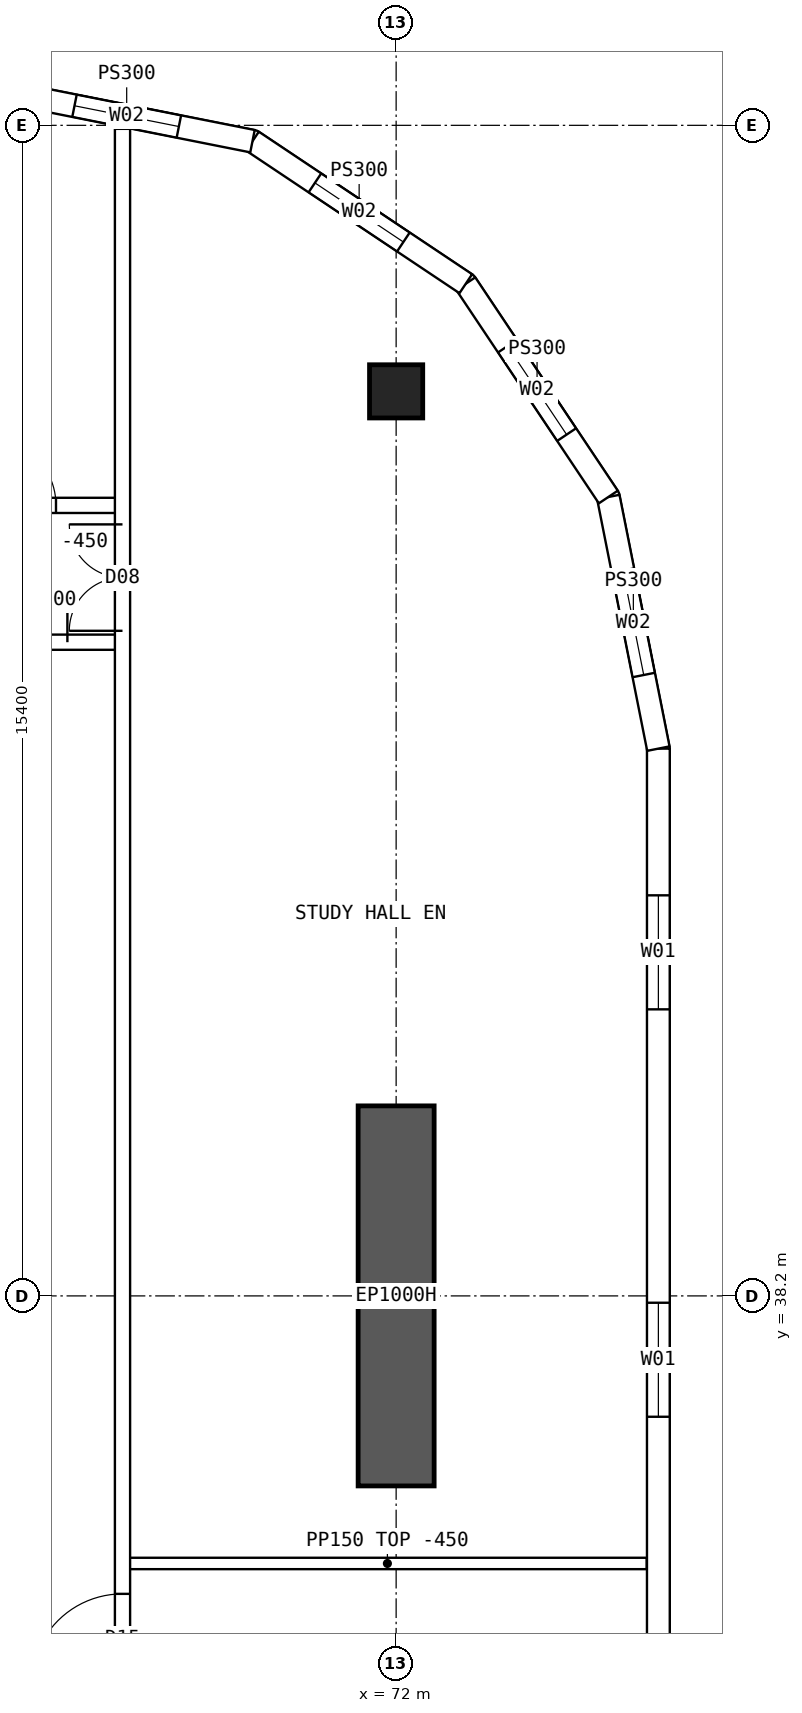
"""IFC4 building model, lengths in metres.
Left out: names, types, materials, properties, quantities, classifications, styles, units other than length and angle.
Written with IfcOpenShell. Run it as: python <this file> out.ifc"""

import sys

from ifc_helpers import new_model, si_unit, direction, frame, frame_2d, origin, origin_2d, place, context, subcontext, project, spatial, polyline, rectangle, hollow_rectangle, outline, extrude, element, fill, save


model = new_model("IFC4")
c1 = context("Model", 3, precision=1e-05, world=origin(), true_north=direction((0.0, 1.0)))
c2 = subcontext(c1, "Body", "Model", "MODEL_VIEW")
j1 = project(units=[si_unit("LENGTHUNIT", "METRE"), si_unit("PLANEANGLEUNIT", "RADIAN")], contexts=[c1])
p1 = place(None, origin())
s1 = spatial("IfcSite", under=j1, at=p1, CompositionType="ELEMENT")
p2 = place(p1, origin())
s2 = spatial("IfcBuilding", under=s1, at=p2, CompositionType="ELEMENT")
p3 = place(p2, frame((0.0, 0.0, 159.85)))
s3 = spatial("IfcBuildingStorey", under=s2, at=p3, CompositionType="ELEMENT", Elevation=159.85)
p4 = place(p3, frame((72.0, 50.1, 0.0), z_axis=(0.0, 0.0, 1.0), x_axis=(1.0, 0.0, 0.0)))
e1 = element("IfcColumn", 1, at=p4, inside=s3, PredefinedType="COLUMN", context=c2, shape_type="SweptSolid", body=[
    extrude(hollow_rectangle(XDim=0.7, YDim=0.7, WallThickness=0.07, at=origin_2d()), origin(), (0.0, 0.0, 1.0), 3.75),
])
p5 = place(p3, frame((72.0, 35.7, 0.0), z_axis=(0.0, 0.0, 1.0), x_axis=(0.0, 1.0, 0.0)))
e2 = element("IfcWall", 2, at=p5, inside=s3, PredefinedType="SHEAR", context=c2, shape_type="SweptSolid", body=[
    extrude(rectangle(XDim=5.0, YDim=1.0, at=frame_2d((2.5, 0.0))), origin(), (0.0, 0.0, 1.0), 3.75),
])
p6 = place(p3, frame((75.45, 18.6, 0.0), z_axis=(0.0, 0.0, 1.0), x_axis=(0.0, 1.0, 0.0)))
e3 = element("IfcWall", 3, at=p6, inside=s3, PredefinedType="SOLIDWALL", context=c2, shape_type="SweptSolid", body=[
    extrude(outline(polyline([(-0.015, -0.15), (26.815, -0.15), (26.785, 0.15), (0.015, 0.15), (-0.015, -0.15)])), origin(), (0.0, 0.0, 1.0), 3.3),
])
p7 = place(p6, frame((1.93, 0.0, 0.9)))
e4 = element("IfcOpeningElement", 4, at=p7, cuts=e3, PredefinedType="OPENING", context=c2, shape_type="SweptSolid", body=[
    extrude(rectangle(XDim=1.5, YDim=2.0, at=frame_2d((0.75, 1.0))), frame((0.0, 0.16, 0.0), z_axis=(0.0, -1.0, 0.0), x_axis=(1.0, 0.0, 0.0)), (0.0, 0.0, 1.0), 0.32),
])
p8 = place(p6, frame((7.29, 0.0, 0.9)))
e5 = element("IfcOpeningElement", 5, at=p8, cuts=e3, PredefinedType="OPENING", context=c2, shape_type="SweptSolid", body=[
    extrude(rectangle(XDim=1.5, YDim=2.0, at=frame_2d((0.75, 1.0))), frame((0.0, 0.16, 0.0), z_axis=(0.0, -1.0, 0.0), x_axis=(1.0, 0.0, 0.0)), (0.0, 0.0, 1.0), 0.32),
])
p9 = place(p6, frame((12.65, 0.0, 0.9)))
e6 = element("IfcOpeningElement", 6, at=p9, cuts=e3, PredefinedType="OPENING", context=c2, shape_type="SweptSolid", body=[
    extrude(rectangle(XDim=1.5, YDim=2.0, at=frame_2d((0.75, 1.0))), frame((0.0, 0.16, 0.0), z_axis=(0.0, -1.0, 0.0), x_axis=(1.0, 0.0, 0.0)), (0.0, 0.0, 1.0), 0.32),
])
p10 = place(p6, frame((18.01, 0.0, 0.9)))
e7 = element("IfcOpeningElement", 7, at=p10, cuts=e3, PredefinedType="OPENING", context=c2, shape_type="SweptSolid", body=[
    extrude(rectangle(XDim=1.5, YDim=2.0, at=frame_2d((0.75, 1.0))), frame((0.0, 0.16, 0.0), z_axis=(0.0, -1.0, 0.0), x_axis=(1.0, 0.0, 0.0)), (0.0, 0.0, 1.0), 0.32),
])
p11 = place(p6, frame((23.37, 0.0, 0.9)))
e8 = element("IfcOpeningElement", 8, at=p11, cuts=e3, PredefinedType="OPENING", context=c2, shape_type="SweptSolid", body=[
    extrude(rectangle(XDim=1.5, YDim=2.0, at=frame_2d((0.75, 1.0))), frame((0.0, 0.16, 0.0), z_axis=(0.0, -1.0, 0.0), x_axis=(1.0, 0.0, 0.0)), (0.0, 0.0, 1.0), 0.32),
])
p12 = place(p3, frame((75.45, 45.4, 0.0), z_axis=(0.0, 0.0, 1.0), x_axis=(-0.19508664885, 0.980786011034, 0.0)))
e9 = element("IfcWall", 9, at=p12, inside=s3, PredefinedType="SOLIDWALL", context=c2, shape_type="SweptSolid", body=[
    extrude(outline(polyline([(-0.015, -0.15), (3.405, -0.15), (3.345, 0.15), (0.015, 0.15), (-0.015, -0.15)])), origin(), (0.0, 0.0, 1.0), 3.3),
])
p13 = place(p12, frame((0.988, 0.0, 0.9)))
e10 = element("IfcOpeningElement", 10, at=p13, cuts=e9, PredefinedType="OPENING", context=c2, shape_type="SweptSolid", body=[
    extrude(rectangle(XDim=1.4, YDim=1.8, at=frame_2d((0.7, 0.9))), frame((0.0, 0.16, 0.0), z_axis=(0.0, -1.0, 0.0), x_axis=(1.0, 0.0, 0.0)), (0.0, 0.0, 1.0), 0.32),
])
p14 = place(p3, frame((74.792, 48.71, 0.0), z_axis=(0.0, 0.0, 1.0), x_axis=(-0.555534554399, 0.831493450887, 0.0)))
e11 = element("IfcWall", 11, at=p14, inside=s3, PredefinedType="SOLIDWALL", context=c2, shape_type="SweptSolid", body=[
    extrude(outline(polyline([(-0.03, -0.15), (3.405, -0.15), (3.345, 0.15), (0.03, 0.15), (-0.03, -0.15)])), origin(), (0.0, 0.0, 1.0), 3.3),
])
p15 = place(p14, frame((0.988, 0.0, 0.9)))
e12 = element("IfcOpeningElement", 12, at=p15, cuts=e11, PredefinedType="OPENING", context=c2, shape_type="SweptSolid", body=[
    extrude(rectangle(XDim=1.4, YDim=1.8, at=frame_2d((0.7, 0.9))), frame((0.0, 0.16, 0.0), z_axis=(0.0, -1.0, 0.0), x_axis=(1.0, 0.0, 0.0)), (0.0, 0.0, 1.0), 0.32),
])
p16 = place(p3, frame((72.917, 51.517, 0.0), z_axis=(0.0, 0.0, 1.0), x_axis=(-0.831493450887, 0.555534554399, 0.0)))
e13 = element("IfcWall", 13, at=p16, inside=s3, PredefinedType="SOLIDWALL", context=c2, shape_type="SweptSolid", body=[
    extrude(outline(polyline([(-0.03, -0.15), (3.405, -0.15), (3.345, 0.15), (0.03, 0.15), (-0.03, -0.15)])), origin(), (0.0, 0.0, 1.0), 3.3),
])
p17 = place(p16, frame((0.988, 0.0, 0.9)))
e14 = element("IfcOpeningElement", 14, at=p17, cuts=e13, PredefinedType="OPENING", context=c2, shape_type="SweptSolid", body=[
    extrude(rectangle(XDim=1.4, YDim=1.8, at=frame_2d((0.7, 0.9))), frame((0.0, 0.16, 0.0), z_axis=(0.0, -1.0, 0.0), x_axis=(1.0, 0.0, 0.0)), (0.0, 0.0, 1.0), 0.32),
])
p18 = place(p3, frame((70.11, 53.392, 0.0), z_axis=(0.0, 0.0, 1.0), x_axis=(-0.98078325777, 0.195100490205, 0.0)))
e15 = element("IfcWall", 15, at=p18, inside=s3, PredefinedType="SOLIDWALL", context=c2, shape_type="SweptSolid", body=[
    extrude(outline(polyline([(-0.03, -0.15), (3.405, -0.15), (3.345, 0.15), (0.03, 0.15), (-0.03, -0.15)])), origin(), (0.0, 0.0, 1.0), 3.3),
])
p19 = place(p18, frame((0.988, 0.0, 0.9)))
e16 = element("IfcOpeningElement", 16, at=p19, cuts=e15, PredefinedType="OPENING", context=c2, shape_type="SweptSolid", body=[
    extrude(rectangle(XDim=1.4, YDim=1.8, at=frame_2d((0.7, 0.9))), frame((0.0, 0.16, 0.0), z_axis=(0.0, -1.0, 0.0), x_axis=(1.0, 0.0, 0.0)), (0.0, 0.0, 1.0), 0.32),
])
p20 = place(p3, frame((66.425, 48.6, 0.0), z_axis=(0.0, 0.0, 1.0), x_axis=(1.0, 0.0, 0.0)))
e17 = element("IfcWall", 17, at=p20, inside=s3, PredefinedType="SOLIDWALL", context=c2, shape_type="SweptSolid", body=[
    extrude(rectangle(XDim=1.975, YDim=0.2, at=frame_2d((0.987, 0.0))), origin(), (0.0, 0.0, 1.0), 3.3),
])
p21 = place(p20, frame((0.2, 0.0, 0.0)))
e18 = element("IfcOpeningElement", 18, at=p21, cuts=e17, PredefinedType="OPENING", context=c2, shape_type="SweptSolid", body=[
    extrude(rectangle(XDim=0.9, YDim=2.1, at=frame_2d((0.45, 1.05))), frame((0.0, 0.11, 0.0), z_axis=(0.0, -1.0, 0.0), x_axis=(1.0, 0.0, 0.0)), (0.0, 0.0, 1.0), 0.22),
])
p22 = place(p3, frame((66.425, 46.8, 0.0), z_axis=(0.0, 0.0, 1.0), x_axis=(1.0, 0.0, 0.0)))
e19 = element("IfcWall", 19, at=p22, inside=s3, PredefinedType="SOLIDWALL", context=c2, shape_type="SweptSolid", body=[
    extrude(rectangle(XDim=1.975, YDim=0.2, at=frame_2d((0.987, 0.0))), origin(), (0.0, 0.0, 1.0), 3.3),
])
p23 = place(p22, frame((0.05, 0.0, 0.0)))
e20 = element("IfcOpeningElement", 20, at=p23, cuts=e19, PredefinedType="OPENING", context=c2, shape_type="SweptSolid", body=[
    extrude(rectangle(XDim=1.2, YDim=2.1, at=frame_2d((0.6, 1.05))), frame((0.0, 0.11, 0.0), z_axis=(0.0, -1.0, 0.0), x_axis=(1.0, 0.0, 0.0)), (0.0, 0.0, 1.0), 0.22),
])
p24 = place(p3, frame((68.4, 10.446, 0.0), z_axis=(0.0, 0.0, 1.0), x_axis=(0.0, 1.0, 0.0)))
e21 = element("IfcWall", 21, at=p24, inside=s3, PredefinedType="SOLIDWALL", context=c2, shape_type="SweptSolid", body=[
    extrude(rectangle(XDim=43.107, YDim=0.2, at=frame_2d((21.554, 0.0))), origin(), (0.0, 0.0, 1.0), 3.3),
])
p25 = place(p24, frame((13.914, 0.0, 0.0)))
e22 = element("IfcOpeningElement", 22, at=p25, cuts=e21, PredefinedType="OPENING", context=c2, shape_type="SweptSolid", body=[
    extrude(rectangle(XDim=1.2, YDim=2.1, at=frame_2d((0.6, 1.05))), frame((0.0, 0.11, 0.0), z_axis=(0.0, -1.0, 0.0), x_axis=(1.0, 0.0, 0.0)), (0.0, 0.0, 1.0), 0.22),
])
p26 = place(p24, frame((22.634, 0.0, 0.0)))
e23 = element("IfcOpeningElement", 23, at=p26, cuts=e21, PredefinedType="OPENING", context=c2, shape_type="SweptSolid", body=[
    extrude(rectangle(XDim=1.2, YDim=2.1, at=frame_2d((0.6, 1.05))), frame((0.0, 0.11, 0.0), z_axis=(0.0, -1.0, 0.0), x_axis=(1.0, 0.0, 0.0)), (0.0, 0.0, 1.0), 0.22),
])
p27 = place(p24, frame((5.104, 0.0, 0.0)))
e24 = element("IfcOpeningElement", 24, at=p27, cuts=e21, PredefinedType="OPENING", context=c2, shape_type="SweptSolid", body=[
    extrude(rectangle(XDim=1.4, YDim=2.1, at=frame_2d((0.7, 1.05))), frame((0.0, 0.11, 0.0), z_axis=(0.0, -1.0, 0.0), x_axis=(1.0, 0.0, 0.0)), (0.0, 0.0, 1.0), 0.22),
])
p28 = place(p24, frame((36.504, 0.0, 0.0)))
e25 = element("IfcOpeningElement", 25, at=p28, cuts=e21, PredefinedType="OPENING", context=c2, shape_type="SweptSolid", body=[
    extrude(rectangle(XDim=1.4, YDim=2.1, at=frame_2d((0.7, 1.05))), frame((0.0, 0.11, 0.0), z_axis=(0.0, -1.0, 0.0), x_axis=(1.0, 0.0, 0.0)), (0.0, 0.0, 1.0), 0.22),
])
p29 = place(p3, frame((68.475, 34.68, 0.0), z_axis=(0.0, 0.0, 1.0), x_axis=(1.0, 0.0, 0.0)))
e26 = element("IfcWall", 26, at=p29, inside=s3, PredefinedType="PARTITIONING", context=c2, shape_type="SweptSolid", body=[
    extrude(outline(polyline([(0.0, 0.0), (6.82, 0.0), (6.82, 3.3), (3.827, 3.3), (3.825, 2.85), (3.227, 2.85), (3.225, 3.3), (0.0, 3.3), (0.0, 0.0)])), frame((0.0, 0.075, 0.0), z_axis=(0.0, -1.0, 0.0), x_axis=(1.0, 0.0, 0.0)), (0.0, 0.0, 1.0), 0.15),
])
p30 = place(p10, origin())
e27 = element("IfcWindow", 27, at=p30, inside=s3, PartitioningType="SINGLE_PANEL", PredefinedType="WINDOW", context=c2, shape_type="SweptSolid", body=[
    extrude(rectangle(XDim=1.5, YDim=2.0, at=frame_2d((0.75, 1.0))), frame((0.0, 0.03, 0.0), z_axis=(0.0, -1.0, 0.0), x_axis=(1.0, 0.0, 0.0)), (0.0, 0.0, 1.0), 0.06),
])
fill(e7, e27)
p31 = place(p11, origin())
e28 = element("IfcWindow", 28, at=p31, inside=s3, PartitioningType="SINGLE_PANEL", PredefinedType="WINDOW", context=c2, shape_type="SweptSolid", body=[
    extrude(rectangle(XDim=1.5, YDim=2.0, at=frame_2d((0.75, 1.0))), frame((0.0, 0.03, 0.0), z_axis=(0.0, -1.0, 0.0), x_axis=(1.0, 0.0, 0.0)), (0.0, 0.0, 1.0), 0.06),
])
fill(e8, e28)
p32 = place(p13, origin())
e29 = element("IfcWindow", 29, at=p32, inside=s3, PartitioningType="SINGLE_PANEL", PredefinedType="WINDOW", context=c2, shape_type="SweptSolid", body=[
    extrude(rectangle(XDim=1.4, YDim=1.8, at=frame_2d((0.7, 0.9))), frame((0.0, 0.03, 0.0), z_axis=(0.0, -1.0, 0.0), x_axis=(1.0, 0.0, 0.0)), (0.0, 0.0, 1.0), 0.06),
])
fill(e10, e29)
p33 = place(p15, origin())
e30 = element("IfcWindow", 30, at=p33, inside=s3, PartitioningType="SINGLE_PANEL", PredefinedType="WINDOW", context=c2, shape_type="SweptSolid", body=[
    extrude(rectangle(XDim=1.4, YDim=1.8, at=frame_2d((0.7, 0.9))), frame((0.0, 0.03, 0.0), z_axis=(0.0, -1.0, 0.0), x_axis=(1.0, 0.0, 0.0)), (0.0, 0.0, 1.0), 0.06),
])
fill(e12, e30)
p34 = place(p17, origin())
e31 = element("IfcWindow", 31, at=p34, inside=s3, PartitioningType="SINGLE_PANEL", PredefinedType="WINDOW", context=c2, shape_type="SweptSolid", body=[
    extrude(rectangle(XDim=1.4, YDim=1.8, at=frame_2d((0.7, 0.9))), frame((0.0, 0.03, 0.0), z_axis=(0.0, -1.0, 0.0), x_axis=(1.0, 0.0, 0.0)), (0.0, 0.0, 1.0), 0.06),
])
fill(e14, e31)
p35 = place(p19, origin())
e32 = element("IfcWindow", 32, at=p35, inside=s3, PartitioningType="SINGLE_PANEL", PredefinedType="WINDOW", context=c2, shape_type="SweptSolid", body=[
    extrude(rectangle(XDim=1.4, YDim=1.8, at=frame_2d((0.7, 0.9))), frame((0.0, 0.03, 0.0), z_axis=(0.0, -1.0, 0.0), x_axis=(1.0, 0.0, 0.0)), (0.0, 0.0, 1.0), 0.06),
])
fill(e16, e32)
p36 = place(p23, origin())
e33 = element("IfcDoor", 33, at=p36, inside=s3, OperationType="DOUBLE_DOOR_SINGLE_SWING", PredefinedType="DOOR", context=c2, shape_type="SweptSolid", body=[
    extrude(rectangle(XDim=1.2, YDim=2.1, at=frame_2d((0.6, 1.05))), frame((0.0, 0.025, 0.0), z_axis=(0.0, -1.0, 0.0), x_axis=(1.0, 0.0, 0.0)), (0.0, 0.0, 1.0), 0.05),
])
fill(e20, e33)
p37 = place(p26, origin())
e34 = element("IfcDoor", 34, at=p37, inside=s3, OperationType="SINGLE_SWING_LEFT", PredefinedType="DOOR", context=c2, shape_type="SweptSolid", body=[
    extrude(rectangle(XDim=1.2, YDim=2.1, at=frame_2d((0.6, 1.05))), frame((0.0, 0.025, 0.0), z_axis=(0.0, -1.0, 0.0), x_axis=(1.0, 0.0, 0.0)), (0.0, 0.0, 1.0), 0.05),
])
fill(e23, e34)
p38 = place(p28, origin())
e35 = element("IfcDoor", 35, at=p38, inside=s3, OperationType="DOUBLE_DOOR_SINGLE_SWING", PredefinedType="DOOR", context=c2, shape_type="SweptSolid", body=[
    extrude(rectangle(XDim=1.4, YDim=2.1, at=frame_2d((0.7, 1.05))), frame((0.0, 0.025, 0.0), z_axis=(0.0, -1.0, 0.0), x_axis=(1.0, 0.0, 0.0)), (0.0, 0.0, 1.0), 0.05),
])
fill(e25, e35)
p39 = place(p21, origin())
e36 = element("IfcDoor", 36, at=p39, inside=s3, OperationType="SINGLE_SWING_LEFT", PredefinedType="DOOR", context=c2, shape_type="SweptSolid", body=[
    extrude(rectangle(XDim=0.9, YDim=2.1, at=frame_2d((0.45, 1.05))), frame((0.0, 0.025, 0.0), z_axis=(0.0, -1.0, 0.0), x_axis=(1.0, 0.0, 0.0)), (0.0, 0.0, 1.0), 0.05),
])
fill(e18, e36)
save(model, sys.argv[1])
